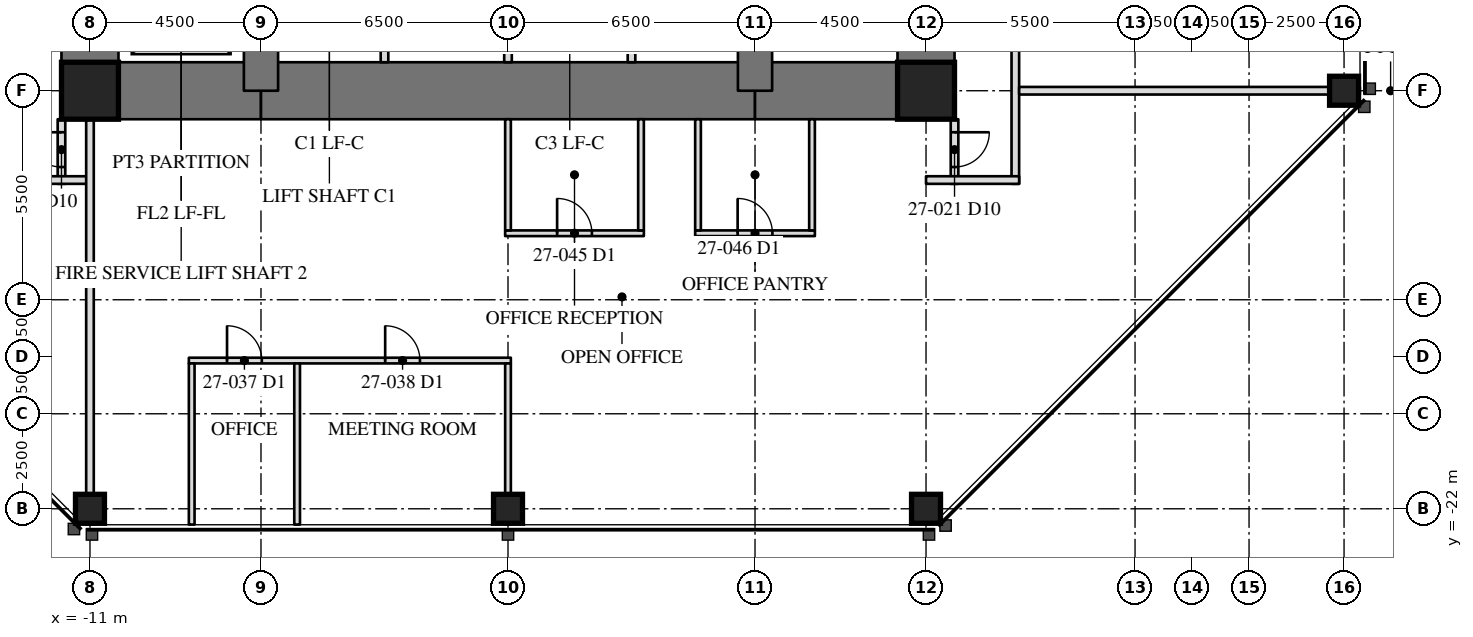
"""IFC4 building model, lengths in metres.
Left out: names, types, materials, properties, quantities, classifications, styles, units other than length and angle.
Written with IfcOpenShell. Run it as: python <this file> out.ifc"""

import sys

from ifc_helpers import new_model, si_unit, direction, frame, frame_2d, origin, origin_2d, place, context, subcontext, project, spatial, rectangle, hollow_rectangle, extrude, element, fill, save


model = new_model("IFC4")
c1 = context("Model", 3, precision=1e-05, world=origin(), true_north=direction((0.0, 1.0)))
c2 = subcontext(c1, "Body", "Model", "MODEL_VIEW")
j1 = project(units=[si_unit("LENGTHUNIT", "METRE"), si_unit("PLANEANGLEUNIT", "RADIAN")], contexts=[c1])
p1 = place(None, origin())
s1 = spatial("IfcSite", under=j1, at=p1, CompositionType="ELEMENT")
p2 = place(p1, origin())
s2 = spatial("IfcBuilding", under=s1, at=p2, CompositionType="ELEMENT")
p3 = place(p2, frame((0.0, 0.0, 117.2)))
s3 = spatial("IfcBuildingStorey", under=s2, at=p3, CompositionType="ELEMENT", Elevation=117.2)
for number, where, z_axis, x_axis in (
    (1, (-11.0, -22.0, 0.0), (0.0, 0.0, 1.0), (1.0, 0.0, 0.0)),
    (2, (0.0, -22.0, 0.0), (0.0, 0.0, 1.0), (1.0, 0.0, 0.0)),
    (3, (11.0, -22.0, 0.0), (0.0, 0.0, 1.0), (1.0, 0.0, 0.0)),
    (4, (22.0, -11.0, 0.0), (0.0, 0.0, 1.0), (0.0, 1.0, 0.0)),
):
    element("IfcColumn", number, at=place(p3, frame(where, z_axis=z_axis, x_axis=x_axis)), inside=s3, PredefinedType="COLUMN", context=c2, shape_type="SweptSolid", body=[
        extrude(hollow_rectangle(XDim=0.762, YDim=0.762, WallThickness=0.127, at=origin_2d()), origin(), (0.0, 0.0, 1.0), 4.1),
    ])
p4 = place(p3, frame((11.0, -11.0, 0.0), z_axis=(0.0, 0.0, 1.0), x_axis=(0.0, 1.0, 0.0)))
e5 = element("IfcWall", 5, at=p4, inside=s3, PredefinedType="SHEAR", context=c2, shape_type="SweptSolid", body=[
    extrude(rectangle(XDim=22.0, YDim=1.5, at=frame_2d((11.0, 0.0))), origin(), (0.0, 0.0, 1.0), 4.1),
])
p5 = place(p4, frame((15.393, 0.0, 0.0)))
e6 = element("IfcOpeningElement", 6, at=p5, cuts=e5, PredefinedType="OPENING", context=c2, shape_type="SweptSolid", body=[
    extrude(rectangle(XDim=0.915, YDim=2.134, at=frame_2d((0.458, 1.067))), frame((0.0, 0.76, 0.0), z_axis=(0.0, -1.0, 0.0), x_axis=(1.0, 0.0, 0.0)), (0.0, 0.0, 1.0), 1.52),
])
p6 = place(p3, frame((-11.0, 11.0, 0.0), z_axis=(0.0, 0.0, 1.0), x_axis=(0.0, -1.0, 0.0)))
e7 = element("IfcWall", 7, at=p6, inside=s3, PredefinedType="SHEAR", context=c2, shape_type="SweptSolid", body=[
    extrude(rectangle(XDim=22.0, YDim=1.5, at=frame_2d((11.0, 0.0))), origin(), (0.0, 0.0, 1.0), 4.1),
])
p7 = place(p6, frame((15.393, 0.0, 0.0)))
e8 = element("IfcOpeningElement", 8, at=p7, cuts=e7, PredefinedType="OPENING", context=c2, shape_type="SweptSolid", body=[
    extrude(rectangle(XDim=0.915, YDim=2.134, at=frame_2d((0.458, 1.067))), frame((0.0, 0.76, 0.0), z_axis=(0.0, -1.0, 0.0), x_axis=(1.0, 0.0, 0.0)), (0.0, 0.0, 1.0), 1.52),
])
p8 = place(p3, frame((-11.0, -11.0, 0.0), z_axis=(0.0, 0.0, 1.0), x_axis=(1.0, 0.0, 0.0)))
e9 = element("IfcWall", 9, at=p8, inside=s3, PredefinedType="SHEAR", context=c2, shape_type="SweptSolid", body=[
    extrude(rectangle(XDim=4.5, YDim=1.5, at=frame_2d((2.25, 0.0))), origin(), (0.0, 0.0, 1.0), 4.1),
])
p9 = place(p3, frame((-6.5, -11.0, 0.0), z_axis=(0.0, 0.0, 1.0), x_axis=(1.0, 0.0, 0.0)))
e10 = element("IfcWall", 10, at=p9, inside=s3, PredefinedType="SHEAR", context=c2, shape_type="SweptSolid", body=[
    extrude(rectangle(XDim=13.0, YDim=1.5, at=frame_2d((6.5, 0.0))), origin(), (0.0, 0.0, 1.0), 4.1),
])
p10 = place(p3, frame((6.5, -11.0, 0.0), z_axis=(0.0, 0.0, 1.0), x_axis=(1.0, 0.0, 0.0)))
e11 = element("IfcWall", 11, at=p10, inside=s3, PredefinedType="SHEAR", context=c2, shape_type="SweptSolid", body=[
    extrude(rectangle(XDim=4.5, YDim=1.5, at=frame_2d((2.25, 0.0))), origin(), (0.0, 0.0, 1.0), 4.1),
])
for number, where, z_axis, x_axis in (
    (12, (6.5, -11.0, 0.0), (0.0, 0.0, 1.0), (0.0, 1.0, 0.0)),
    (13, (-6.5, -6.5, 0.0), (0.0, 0.0, 1.0), (0.0, -1.0, 0.0)),
):
    element("IfcWall", number, at=place(p3, frame(where, z_axis=z_axis, x_axis=x_axis)), inside=s3, PredefinedType="SHEAR", context=c2, shape_type="SweptSolid", body=[
        extrude(rectangle(XDim=4.5, YDim=0.9, at=frame_2d((2.25, 0.0))), origin(), (0.0, 0.0, 1.0), 4.1),
    ])
for number, where, z_axis, x_axis in (
    (14, (-11.0, -11.0, 0.0), (0.0, 0.0, 1.0), (1.0, 0.0, 0.0)),
    (15, (11.0, -11.0, 0.0), (0.0, 0.0, 1.0), (1.0, 0.0, 0.0)),
):
    element("IfcColumn", number, at=place(p3, frame(where, z_axis=z_axis, x_axis=x_axis)), inside=s3, PredefinedType="COLUMN", context=c2, shape_type="SweptSolid", body=[
        extrude(hollow_rectangle(XDim=1.499, YDim=1.499, WallThickness=0.102, at=origin_2d()), origin(), (0.0, 0.0, 1.0), 4.1),
    ])
for number, where, z_axis, x_axis in (
    (16, (-3.25, -10.25, 0.0), (0.0, 0.0, 1.0), (0.0, 1.0, 0.0)),
    (17, (0.0, -10.25, 0.0), (0.0, 0.0, 1.0), (0.0, 1.0, 0.0)),
    (18, (3.25, -10.25, 0.0), (0.0, 0.0, 1.0), (0.0, 1.0, 0.0)),
):
    element("IfcWall", number, at=place(p3, frame(where, z_axis=z_axis, x_axis=x_axis)), inside=s3, PredefinedType="PARTITIONING", context=c2, shape_type="SweptSolid", body=[
        extrude(rectangle(XDim=3.3, YDim=0.2, at=frame_2d((1.65, 0.0))), origin(), (0.0, 0.0, 1.0), 3.91),
    ])
p11 = place(p3, frame((13.35, -13.45, 0.0), z_axis=(0.0, 0.0, 1.0), x_axis=(0.0, 1.0, 0.0)))
e19 = element("IfcWall", 19, at=p11, inside=s3, PredefinedType="PARTITIONING", context=c2, shape_type="SweptSolid", body=[
    extrude(rectangle(XDim=26.7, YDim=0.2, at=frame_2d((13.35, 0.0))), origin(), (0.0, 0.0, 1.0), 3.91),
])
p12 = place(p11, frame((6.742, 0.0, 0.0)))
e20 = element("IfcOpeningElement", 20, at=p12, cuts=e19, PredefinedType="OPENING", context=c2, shape_type="SweptSolid", body=[
    extrude(rectangle(XDim=0.915, YDim=2.134, at=frame_2d((0.458, 1.067))), frame((0.0, 0.11, 0.0), z_axis=(0.0, -1.0, 0.0), x_axis=(1.0, 0.0, 0.0)), (0.0, 0.0, 1.0), 0.22),
])
p13 = place(p3, frame((11.75, -11.75, 0.0), z_axis=(0.0, 0.0, 1.0), x_axis=(0.0, -1.0, 0.0)))
e21 = element("IfcWall", 21, at=p13, inside=s3, PredefinedType="PARTITIONING", context=c2, shape_type="SweptSolid", body=[
    extrude(rectangle(XDim=1.7, YDim=0.2, at=frame_2d((0.85, 0.0))), origin(), (0.0, 0.0, 1.0), 3.91),
])
p14 = place(p13, frame((0.343, 0.0, 0.0)))
e22 = element("IfcOpeningElement", 22, at=p14, cuts=e21, PredefinedType="OPENING", context=c2, shape_type="SweptSolid", body=[
    extrude(rectangle(XDim=0.915, YDim=2.134, at=frame_2d((0.458, 1.067))), frame((0.0, 0.11, 0.0), z_axis=(0.0, -1.0, 0.0), x_axis=(1.0, 0.0, 0.0)), (0.0, 0.0, 1.0), 0.22),
])
p15 = place(p3, frame((11.0, -13.35, 0.0), z_axis=(0.0, 0.0, 1.0), x_axis=(1.0, 0.0, 0.0)))
e23 = element("IfcWall", 23, at=p15, inside=s3, PredefinedType="PARTITIONING", context=c2, shape_type="SweptSolid", body=[
    extrude(rectangle(XDim=2.45, YDim=0.2, at=frame_2d((1.225, 0.0))), origin(), (0.0, 0.0, 1.0), 3.91),
])
p16 = place(p3, frame((-11.75, -11.75, 0.0), z_axis=(0.0, 0.0, 1.0), x_axis=(0.0, -1.0, 0.0)))
e24 = element("IfcWall", 24, at=p16, inside=s3, PredefinedType="PARTITIONING", context=c2, shape_type="SweptSolid", body=[
    extrude(rectangle(XDim=1.7, YDim=0.2, at=frame_2d((0.85, 0.0))), origin(), (0.0, 0.0, 1.0), 3.91),
])
p17 = place(p16, frame((0.343, 0.0, 0.0)))
e25 = element("IfcOpeningElement", 25, at=p17, cuts=e24, PredefinedType="OPENING", context=c2, shape_type="SweptSolid", body=[
    extrude(rectangle(XDim=0.915, YDim=2.134, at=frame_2d((0.458, 1.067))), frame((0.0, 0.11, 0.0), z_axis=(0.0, -1.0, 0.0), x_axis=(1.0, 0.0, 0.0)), (0.0, 0.0, 1.0), 0.22),
])
p18 = place(p3, frame((-11.0, -13.35, 0.0), z_axis=(0.0, 0.0, 1.0), x_axis=(-1.0, 0.0, 0.0)))
e26 = element("IfcWall", 26, at=p18, inside=s3, PredefinedType="PARTITIONING", context=c2, shape_type="SweptSolid", body=[
    extrude(rectangle(XDim=2.45, YDim=0.2, at=frame_2d((1.225, 0.0))), origin(), (0.0, 0.0, 1.0), 3.91),
])
p19 = place(p3, frame((-11.0, -11.75, 0.0), z_axis=(0.0, 0.0, 1.0), x_axis=(0.0, -1.0, 0.0)))
e27 = element("IfcWall", 27, at=p19, inside=s3, PredefinedType="PARTITIONING", context=c2, shape_type="SweptSolid", body=[
    extrude(rectangle(XDim=10.665, YDim=0.2, at=frame_2d((5.333, 0.0))), origin(), (0.0, 0.0, 1.0), 3.326),
])
p20 = place(p3, frame((13.45, -11.0, 0.0), z_axis=(0.0, 0.0, 1.0), x_axis=(1.0, 0.0, 0.0)))
e28 = element("IfcWall", 28, at=p20, inside=s3, PredefinedType="PARTITIONING", context=c2, shape_type="SweptSolid", body=[
    extrude(rectangle(XDim=8.965, YDim=0.2, at=frame_2d((4.482, 0.0))), origin(), (0.0, 0.0, 1.0), 3.326),
])
p21 = place(p3, frame((-8.398, -18.1, 0.0), z_axis=(0.0, 0.0, 1.0), x_axis=(1.0, 0.0, 0.0)))
e29 = element("IfcWall", 29, at=p21, inside=s3, PredefinedType="PARTITIONING", context=c2, shape_type="SweptSolid", body=[
    extrude(rectangle(XDim=8.473, YDim=0.15, at=frame_2d((4.236, 0.0))), origin(), (0.0, 0.0, 1.0), 3.91),
])
p22 = place(p21, frame((1.004, 0.0, 0.0)))
e30 = element("IfcOpeningElement", 30, at=p22, cuts=e29, PredefinedType="OPENING", context=c2, shape_type="SweptSolid", body=[
    extrude(rectangle(XDim=0.915, YDim=2.134, at=frame_2d((0.458, 1.067))), frame((0.0, 0.085, 0.0), z_axis=(0.0, -1.0, 0.0), x_axis=(1.0, 0.0, 0.0)), (0.0, 0.0, 1.0), 0.17),
])
p23 = place(p21, frame((5.166, 0.0, 0.0)))
e31 = element("IfcOpeningElement", 31, at=p23, cuts=e29, PredefinedType="OPENING", context=c2, shape_type="SweptSolid", body=[
    extrude(rectangle(XDim=0.915, YDim=2.134, at=frame_2d((0.458, 1.067))), frame((0.0, 0.085, 0.0), z_axis=(0.0, -1.0, 0.0), x_axis=(1.0, 0.0, 0.0)), (0.0, 0.0, 1.0), 0.17),
])
for number, where, z_axis, x_axis in (
    (32, (-8.323, -18.175, 0.0), (0.0, 0.0, 1.0), (0.0, -1.0, 0.0)),
    (33, (-5.549, -18.175, 0.0), (0.0, 0.0, 1.0), (0.0, -1.0, 0.0)),
):
    element("IfcWall", number, at=place(p3, frame(where, z_axis=z_axis, x_axis=x_axis)), inside=s3, PredefinedType="PARTITIONING", context=c2, shape_type="SweptSolid", body=[
        extrude(rectangle(XDim=4.24, YDim=0.15, at=frame_2d((2.12, 0.0))), origin(), (0.0, 0.0, 1.0), 3.91),
    ])
p24 = place(p3, frame((0.0, -18.175, 0.0), z_axis=(0.0, 0.0, 1.0), x_axis=(0.0, -1.0, 0.0)))
e34 = element("IfcWall", 34, at=p24, inside=s3, PredefinedType="PARTITIONING", context=c2, shape_type="SweptSolid", body=[
    extrude(rectangle(XDim=4.24, YDim=0.15, at=frame_2d((2.12, 0.0))), origin(), (0.0, 0.0, 1.0), 3.326),
])
p25 = place(p3, frame((-0.075, -14.75, 0.0), z_axis=(0.0, 0.0, 1.0), x_axis=(1.0, 0.0, 0.0)))
e35 = element("IfcWall", 35, at=p25, inside=s3, PredefinedType="PARTITIONING", context=c2, shape_type="SweptSolid", body=[
    extrude(rectangle(XDim=3.65, YDim=0.15, at=frame_2d((1.825, 0.0))), origin(), (0.0, 0.0, 1.0), 3.91),
])
p26 = place(p25, frame((1.367, 0.0, 0.0)))
e36 = element("IfcOpeningElement", 36, at=p26, cuts=e35, PredefinedType="OPENING", context=c2, shape_type="SweptSolid", body=[
    extrude(rectangle(XDim=0.915, YDim=2.134, at=frame_2d((0.458, 1.067))), frame((0.0, 0.085, 0.0), z_axis=(0.0, -1.0, 0.0), x_axis=(1.0, 0.0, 0.0)), (0.0, 0.0, 1.0), 0.17),
])
p27 = place(p3, frame((0.0, -14.675, 0.0), z_axis=(0.0, 0.0, 1.0), x_axis=(0.0, 1.0, 0.0)))
e37 = element("IfcWall", 37, at=p27, inside=s3, PredefinedType="PARTITIONING", context=c2, shape_type="SweptSolid", body=[
    extrude(rectangle(XDim=2.925, YDim=0.15, at=frame_2d((1.462, 0.0))), origin(), (0.0, 0.0, 1.0), 3.326),
])
p28 = place(p3, frame((3.5, -14.675, 0.0), z_axis=(0.0, 0.0, 1.0), x_axis=(0.0, 1.0, 0.0)))
e38 = element("IfcWall", 38, at=p28, inside=s3, PredefinedType="PARTITIONING", context=c2, shape_type="SweptSolid", body=[
    extrude(rectangle(XDim=2.925, YDim=0.15, at=frame_2d((1.462, 0.0))), origin(), (0.0, 0.0, 1.0), 3.91),
])
p29 = place(p3, frame((4.925, -14.75, 0.0), z_axis=(0.0, 0.0, 1.0), x_axis=(1.0, 0.0, 0.0)))
e39 = element("IfcWall", 39, at=p29, inside=s3, PredefinedType="PARTITIONING", context=c2, shape_type="SweptSolid", body=[
    extrude(rectangle(XDim=3.15, YDim=0.15, at=frame_2d((1.575, 0.0))), origin(), (0.0, 0.0, 1.0), 3.91),
])
p30 = place(p29, frame((1.117, 0.0, 0.0)))
e40 = element("IfcOpeningElement", 40, at=p30, cuts=e39, PredefinedType="OPENING", context=c2, shape_type="SweptSolid", body=[
    extrude(rectangle(XDim=0.915, YDim=2.134, at=frame_2d((0.458, 1.067))), frame((0.0, 0.085, 0.0), z_axis=(0.0, -1.0, 0.0), x_axis=(1.0, 0.0, 0.0)), (0.0, 0.0, 1.0), 0.17),
])
for number, where, z_axis, x_axis in (
    (41, (5.0, -14.675, 0.0), (0.0, 0.0, 1.0), (0.0, 1.0, 0.0)),
    (42, (8.0, -14.675, 0.0), (0.0, 0.0, 1.0), (0.0, 1.0, 0.0)),
):
    element("IfcWall", number, at=place(p3, frame(where, z_axis=z_axis, x_axis=x_axis)), inside=s3, PredefinedType="PARTITIONING", context=c2, shape_type="SweptSolid", body=[
        extrude(rectangle(XDim=2.925, YDim=0.15, at=frame_2d((1.462, 0.0))), origin(), (0.0, 0.0, 1.0), 3.91),
    ])
p31 = place(p14, origin())
e43 = element("IfcDoor", 43, at=p31, inside=s3, OperationType="SINGLE_SWING_LEFT", PredefinedType="DOOR", context=c2, shape_type="SweptSolid", body=[
    extrude(rectangle(XDim=0.915, YDim=2.134, at=frame_2d((0.458, 1.067))), frame((0.0, 0.025, 0.0), z_axis=(0.0, -1.0, 0.0), x_axis=(1.0, 0.0, 0.0)), (0.0, 0.0, 1.0), 0.05),
])
fill(e22, e43)
p32 = place(p17, frame((0.915, 0.0, 0.0), z_axis=(0.0, 0.0, 1.0), x_axis=(-1.0, 0.0, 0.0)))
e44 = element("IfcDoor", 44, at=p32, inside=s3, OperationType="SINGLE_SWING_LEFT", PredefinedType="DOOR", context=c2, shape_type="SweptSolid", body=[
    extrude(rectangle(XDim=0.915, YDim=2.134, at=frame_2d((0.458, 1.067))), frame((0.0, 0.025, 0.0), z_axis=(0.0, -1.0, 0.0), x_axis=(1.0, 0.0, 0.0)), (0.0, 0.0, 1.0), 0.05),
])
fill(e25, e44)
p33 = place(p22, origin())
e45 = element("IfcDoor", 45, at=p33, inside=s3, OperationType="SINGLE_SWING_LEFT", PredefinedType="DOOR", context=c2, shape_type="SweptSolid", body=[
    extrude(rectangle(XDim=0.915, YDim=2.134, at=frame_2d((0.458, 1.067))), frame((0.0, 0.025, 0.0), z_axis=(0.0, -1.0, 0.0), x_axis=(1.0, 0.0, 0.0)), (0.0, 0.0, 1.0), 0.05),
])
fill(e30, e45)
p34 = place(p23, origin())
e46 = element("IfcDoor", 46, at=p34, inside=s3, OperationType="SINGLE_SWING_LEFT", PredefinedType="DOOR", context=c2, shape_type="SweptSolid", body=[
    extrude(rectangle(XDim=0.915, YDim=2.134, at=frame_2d((0.458, 1.067))), frame((0.0, 0.025, 0.0), z_axis=(0.0, -1.0, 0.0), x_axis=(1.0, 0.0, 0.0)), (0.0, 0.0, 1.0), 0.05),
])
fill(e31, e46)
p35 = place(p26, origin())
e47 = element("IfcDoor", 47, at=p35, inside=s3, OperationType="SINGLE_SWING_LEFT", PredefinedType="DOOR", context=c2, shape_type="SweptSolid", body=[
    extrude(rectangle(XDim=0.915, YDim=2.134, at=frame_2d((0.458, 1.067))), frame((0.0, 0.025, 0.0), z_axis=(0.0, -1.0, 0.0), x_axis=(1.0, 0.0, 0.0)), (0.0, 0.0, 1.0), 0.05),
])
fill(e36, e47)
p36 = place(p30, origin())
e48 = element("IfcDoor", 48, at=p36, inside=s3, OperationType="SINGLE_SWING_LEFT", PredefinedType="DOOR", context=c2, shape_type="SweptSolid", body=[
    extrude(rectangle(XDim=0.915, YDim=2.134, at=frame_2d((0.458, 1.067))), frame((0.0, 0.025, 0.0), z_axis=(0.0, -1.0, 0.0), x_axis=(1.0, 0.0, 0.0)), (0.0, 0.0, 1.0), 0.05),
])
fill(e40, e48)
save(model, sys.argv[1])
